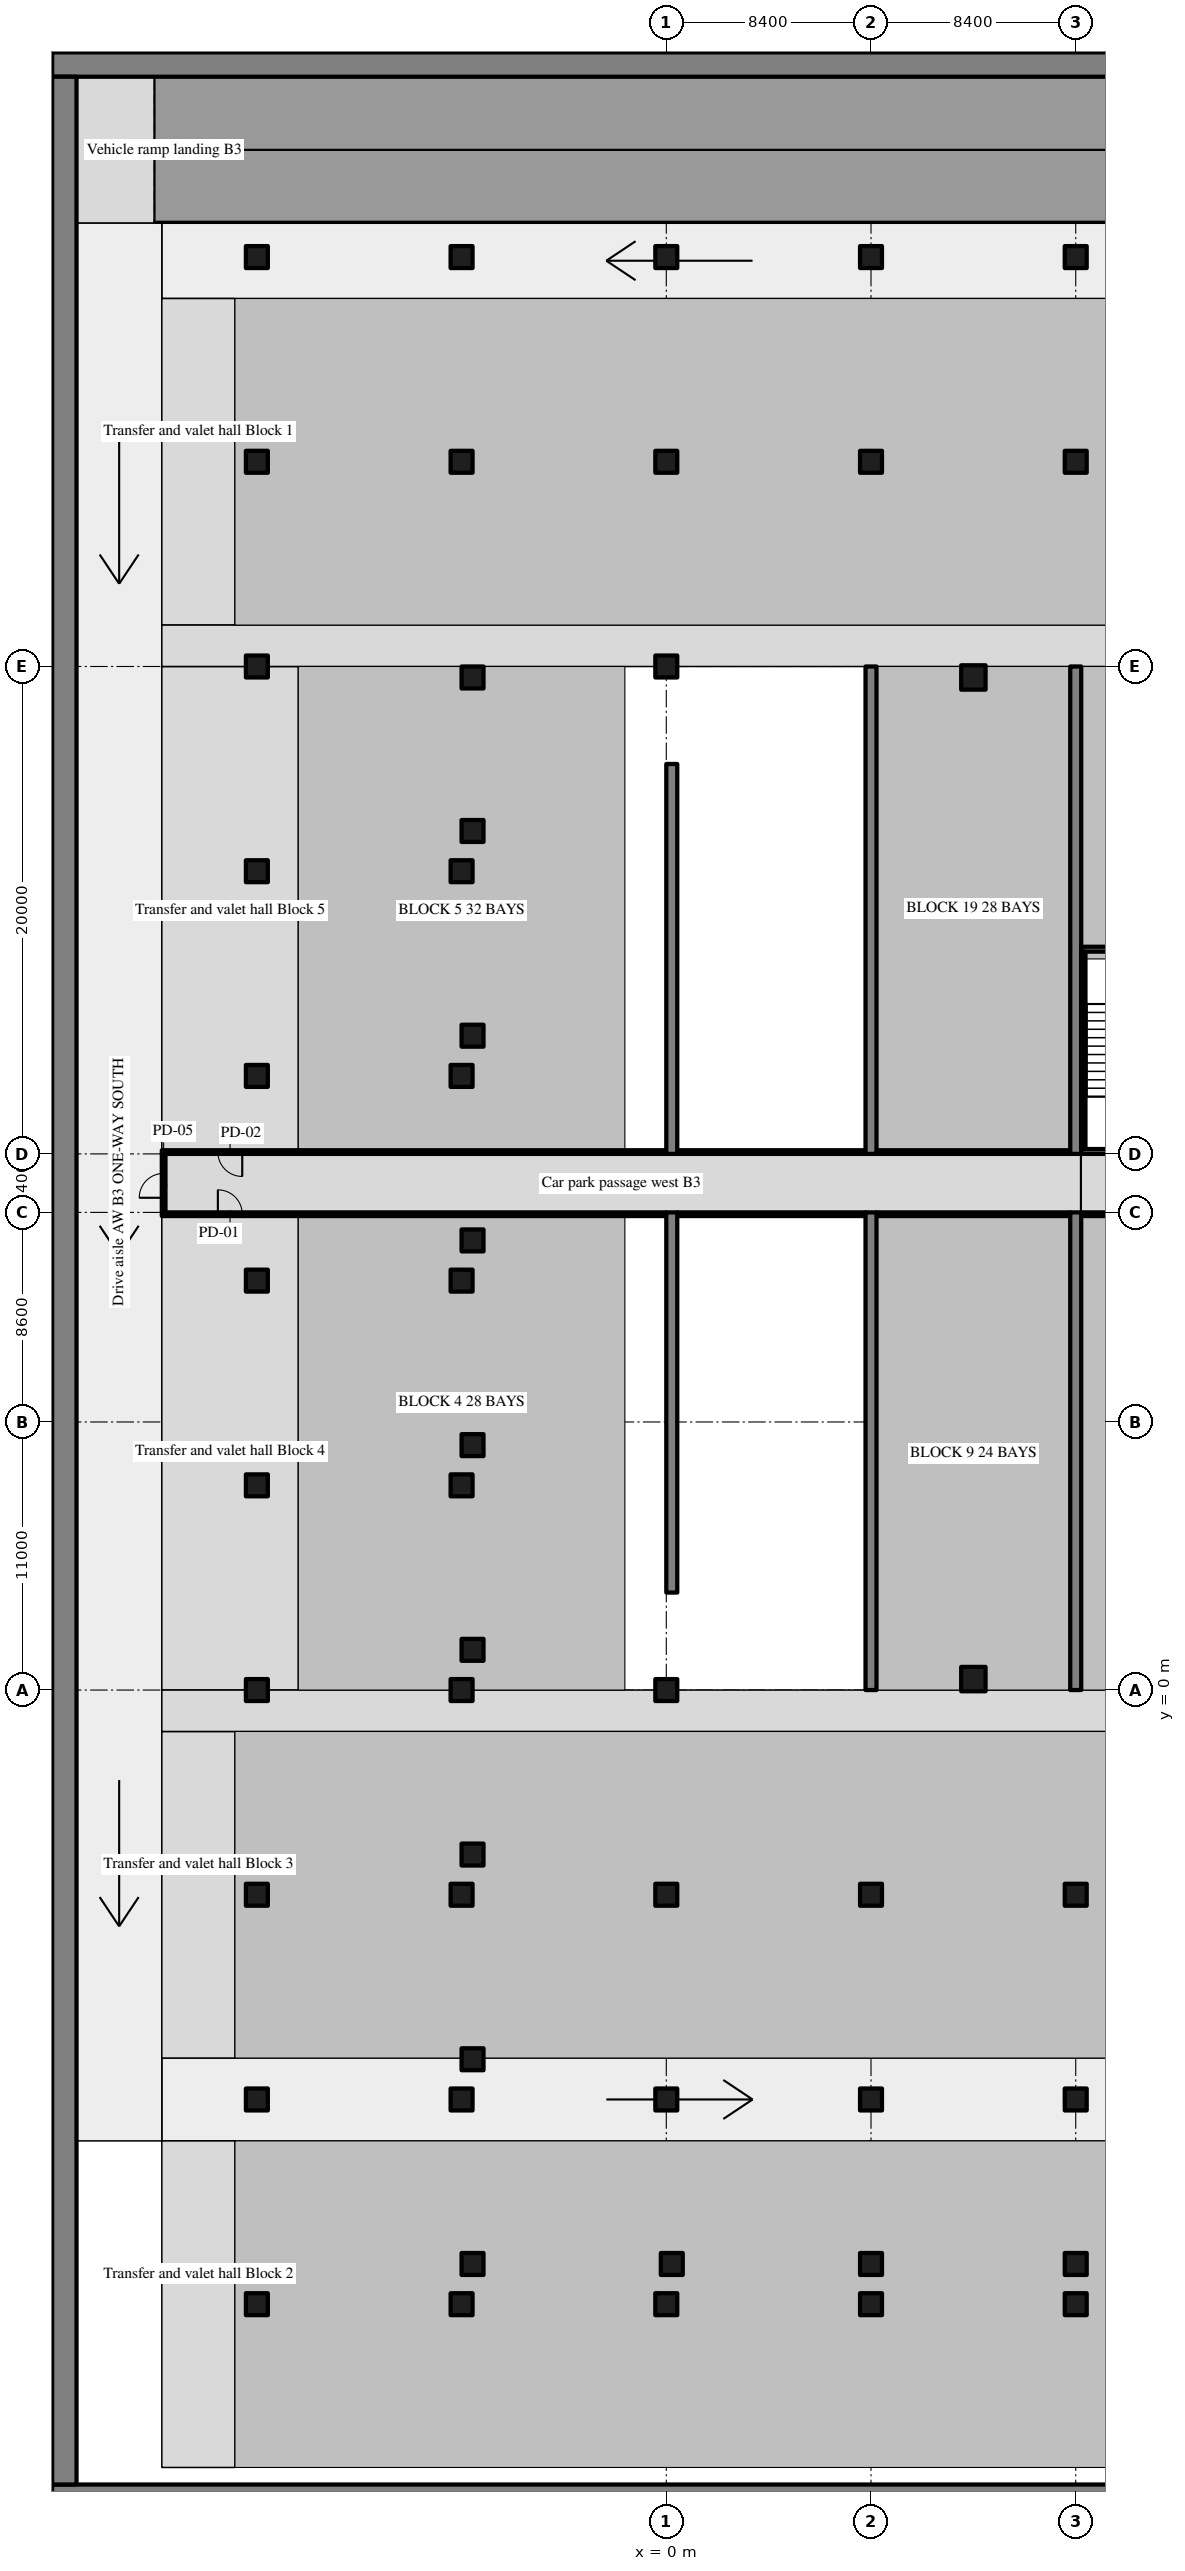
"""IFC4 building model, lengths in metres.
Left out: names, types, materials, properties, quantities, classifications, styles, units other than length and angle.
Written with IfcOpenShell. Run it as: python <this file> out.ifc"""

import sys

from ifc_helpers import new_model, si_unit, direction, frame, frame_2d, origin, origin_2d, place, context, subcontext, project, spatial, rectangle, extrude, source, transform, mapped, element, fill, save


model = new_model("IFC4")
c1 = context("Model", 3, precision=1e-05, world=origin(), true_north=direction((0.0, 1.0)))
c2 = subcontext(c1, "Body", "Model", "MODEL_VIEW")
j1 = project(units=[si_unit("LENGTHUNIT", "METRE"), si_unit("PLANEANGLEUNIT", "RADIAN")], contexts=[c1])
p1 = place(None, origin())
s1 = spatial("IfcSite", under=j1, at=p1, CompositionType="ELEMENT")
p2 = place(p1, origin())
s2 = spatial("IfcBuilding", under=s1, at=p2, CompositionType="ELEMENT")
p3 = place(p2, frame((0.0, 0.0, -13.5)))
s3 = spatial("IfcBuildingStorey", under=s2, at=p3, CompositionType="ELEMENT", Elevation=-13.5)
m1 = source(origin(), c2, "Body", "SweptSolid", [
    extrude(rectangle(XDim=151.2, YDim=1.0, at=frame_2d((75.6, 0.0))), origin(), (0.0, 0.0, 1.0), 4.52),
])
for number, where, z_axis, x_axis in (
    (1, (-25.2, -33.1, -0.3), (0.0, 0.0, 1.0), (1.0, 0.0, 0.0)),
    (2, (-25.2, 66.7, -0.3), (0.0, 0.0, 1.0), (1.0, 0.0, 0.0)),
):
    element("IfcWall", number, at=place(p3, frame(where, z_axis=z_axis, x_axis=x_axis)), inside=s3, PredefinedType="SHEAR", context=c2, shape_type="MappedRepresentation", body=[
        mapped(m1, transform((0.0, 0.0, 0.0), scale=1.0)),
    ])
m2 = source(origin(), c2, "Body", "SweptSolid", [
    extrude(rectangle(XDim=98.8, YDim=1.0, at=frame_2d((49.4, 0.0))), origin(), (0.0, 0.0, 1.0), 4.52),
])
p4 = place(p3, frame((-24.7, -32.6, -0.3), z_axis=(0.0, 0.0, 1.0), x_axis=(0.0, 1.0, 0.0)))
e3 = element("IfcWall", 3, at=p4, inside=s3, PredefinedType="SHEAR", context=c2, shape_type="MappedRepresentation", body=[
    mapped(m2, transform((0.0, 0.0, 0.0), scale=1.0)),
])
m3 = source(origin(), c2, "Body", "SweptSolid", [
    extrude(rectangle(XDim=15.6, YDim=0.45, at=frame_2d((7.8, 0.0))), origin(), (0.0, 0.0, 1.0), 4.52),
])
p5 = place(p3, frame((0.225, 4.0, -0.3), z_axis=(0.0, 0.0, 1.0), x_axis=(0.0, 1.0, 0.0)))
e4 = element("IfcWall", 4, at=p5, inside=s3, PredefinedType="SHEAR", context=c2, shape_type="MappedRepresentation", body=[
    mapped(m3, transform((0.0, 0.0, 0.0), scale=1.0)),
])
m4 = source(origin(), c2, "Body", "SweptSolid", [
    extrude(rectangle(XDim=16.0, YDim=0.45, at=frame_2d((8.0, 0.0))), origin(), (0.0, 0.0, 1.0), 4.52),
])
p6 = place(p3, frame((0.225, 22.0, -0.3), z_axis=(0.0, 0.0, 1.0), x_axis=(0.0, 1.0, 0.0)))
e5 = element("IfcWall", 5, at=p6, inside=s3, PredefinedType="SHEAR", context=c2, shape_type="MappedRepresentation", body=[
    mapped(m4, transform((0.0, 0.0, 0.0), scale=1.0)),
])
m5 = source(origin(), c2, "Body", "SweptSolid", [
    extrude(rectangle(XDim=19.6, YDim=0.45, at=frame_2d((9.8, 0.0))), origin(), (0.0, 0.0, 1.0), 4.52),
])
p7 = place(p3, frame((8.4, 0.0, -0.3), z_axis=(0.0, 0.0, 1.0), x_axis=(0.0, 1.0, 0.0)))
e6 = element("IfcWall", 6, at=p7, inside=s3, PredefinedType="SHEAR", context=c2, shape_type="MappedRepresentation", body=[
    mapped(m5, transform((0.0, 0.0, 0.0), scale=1.0)),
])
m6 = source(origin(), c2, "Body", "SweptSolid", [
    extrude(rectangle(XDim=20.0, YDim=0.45, at=frame_2d((10.0, 0.0))), origin(), (0.0, 0.0, 1.0), 4.52),
])
p8 = place(p3, frame((8.4, 22.0, -0.3), z_axis=(0.0, 0.0, 1.0), x_axis=(0.0, 1.0, 0.0)))
e7 = element("IfcWall", 7, at=p8, inside=s3, PredefinedType="SHEAR", context=c2, shape_type="MappedRepresentation", body=[
    mapped(m6, transform((0.0, 0.0, 0.0), scale=1.0)),
])
p9 = place(p3, frame((16.8, 0.0, -0.3), z_axis=(0.0, 0.0, 1.0), x_axis=(0.0, 1.0, 0.0)))
e8 = element("IfcWall", 8, at=p9, inside=s3, PredefinedType="SHEAR", context=c2, shape_type="MappedRepresentation", body=[
    mapped(m5, transform((0.0, 0.0, 0.0), scale=1.0)),
])
p10 = place(p3, frame((16.8, 22.0, -0.3), z_axis=(0.0, 0.0, 1.0), x_axis=(0.0, 1.0, 0.0)))
e9 = element("IfcWall", 9, at=p10, inside=s3, PredefinedType="SHEAR", context=c2, shape_type="MappedRepresentation", body=[
    mapped(m6, transform((0.0, 0.0, 0.0), scale=1.0)),
])
m7 = source(origin(), c2, "Body", "SweptSolid", [
    extrude(rectangle(XDim=1.0, YDim=1.0, at=origin_2d()), origin(), (0.0, 0.0, 1.0), 4.52),
])
for number, where, z_axis, x_axis in (
    (10, (12.6, 0.45, -0.3), (0.0, 0.0, 1.0), (1.0, 0.0, 0.0)),
    (11, (12.6, 41.55, -0.3), (0.0, 0.0, 1.0), (1.0, 0.0, 0.0)),
):
    element("IfcColumn", number, at=place(p3, frame(where, z_axis=z_axis, x_axis=x_axis)), inside=s3, PredefinedType="COLUMN", context=c2, shape_type="MappedRepresentation", body=[
        mapped(m7, transform((0.0, 0.0, 0.0), scale=1.0)),
    ])
m8 = source(origin(), c2, "Body", "SweptSolid", [
    extrude(rectangle(XDim=0.9, YDim=0.9, at=origin_2d()), origin(), (0.0, 0.0, 1.0), 4.52),
])
for number, where, z_axis, x_axis in (
    (12, (-7.95, -23.55, -0.3), (0.0, 0.0, 1.0), (1.0, 0.0, 0.0)),
    (13, (-7.95, -15.15, -0.3), (0.0, 0.0, 1.0), (1.0, 0.0, 0.0)),
    (14, (-7.95, -6.75, -0.3), (0.0, 0.0, 1.0), (1.0, 0.0, 0.0)),
    (15, (-7.95, 1.65, -0.3), (0.0, 0.0, 1.0), (1.0, 0.0, 0.0)),
    (16, (-7.95, 10.05, -0.3), (0.0, 0.0, 1.0), (1.0, 0.0, 0.0)),
    (17, (-7.95, 18.45, -0.3), (0.0, 0.0, 1.0), (1.0, 0.0, 0.0)),
    (18, (-7.95, 26.85, -0.3), (0.0, 0.0, 1.0), (1.0, 0.0, 0.0)),
    (19, (-7.95, 35.25, -0.3), (0.0, 0.0, 1.0), (1.0, 0.0, 0.0)),
    (20, (-7.95, 41.55, -0.3), (0.0, 0.0, 1.0), (1.0, 0.0, 0.0)),
    (21, (0.225, -23.55, -0.3), (0.0, 0.0, 1.0), (1.0, 0.0, 0.0)),
    (22, (8.4, -23.55, -0.3), (0.0, 0.0, 1.0), (1.0, 0.0, 0.0)),
    (23, (16.8, -23.55, -0.3), (0.0, 0.0, 1.0), (1.0, 0.0, 0.0)),
    (24, (-16.8, -25.2, -0.3), (0.0, 0.0, 1.0), (1.0, 0.0, 0.0)),
    (25, (-16.8, -16.8, -0.3), (0.0, 0.0, 1.0), (1.0, 0.0, 0.0)),
    (26, (-16.8, -8.4, -0.3), (0.0, 0.0, 1.0), (1.0, 0.0, 0.0)),
    (27, (-16.8, 0.0, -0.3), (0.0, 0.0, 1.0), (1.0, 0.0, 0.0)),
    (28, (-16.8, 8.4, -0.3), (0.0, 0.0, 1.0), (1.0, 0.0, 0.0)),
    (29, (-16.8, 16.8, -0.3), (0.0, 0.0, 1.0), (1.0, 0.0, 0.0)),
    (30, (-16.8, 25.2, -0.3), (0.0, 0.0, 1.0), (1.0, 0.0, 0.0)),
    (31, (-16.8, 33.6, -0.3), (0.0, 0.0, 1.0), (1.0, 0.0, 0.0)),
    (32, (-16.8, 42.0, -0.3), (0.0, 0.0, 1.0), (1.0, 0.0, 0.0)),
    (33, (-16.8, 50.4, -0.3), (0.0, 0.0, 1.0), (1.0, 0.0, 0.0)),
    (34, (-16.8, 58.8, -0.3), (0.0, 0.0, 1.0), (1.0, 0.0, 0.0)),
    (35, (-8.4, -25.2, -0.3), (0.0, 0.0, 1.0), (1.0, 0.0, 0.0)),
    (36, (-8.4, -16.8, -0.3), (0.0, 0.0, 1.0), (1.0, 0.0, 0.0)),
    (37, (-8.4, -8.4, -0.3), (0.0, 0.0, 1.0), (1.0, 0.0, 0.0)),
    (38, (-8.4, 0.0, -0.3), (0.0, 0.0, 1.0), (1.0, 0.0, 0.0)),
    (39, (-8.4, 8.4, -0.3), (0.0, 0.0, 1.0), (1.0, 0.0, 0.0)),
    (40, (-8.4, 16.8, -0.3), (0.0, 0.0, 1.0), (1.0, 0.0, 0.0)),
    (41, (-8.4, 25.2, -0.3), (0.0, 0.0, 1.0), (1.0, 0.0, 0.0)),
    (42, (-8.4, 33.6, -0.3), (0.0, 0.0, 1.0), (1.0, 0.0, 0.0)),
    (43, (-8.4, 50.4, -0.3), (0.0, 0.0, 1.0), (1.0, 0.0, 0.0)),
    (44, (-8.4, 58.8, -0.3), (0.0, 0.0, 1.0), (1.0, 0.0, 0.0)),
    (45, (0.0, -25.2, -0.3), (0.0, 0.0, 1.0), (1.0, 0.0, 0.0)),
    (46, (0.0, -16.8, -0.3), (0.0, 0.0, 1.0), (1.0, 0.0, 0.0)),
    (47, (0.0, -8.4, -0.3), (0.0, 0.0, 1.0), (1.0, 0.0, 0.0)),
    (48, (0.0, 0.0, -0.3), (0.0, 0.0, 1.0), (1.0, 0.0, 0.0)),
    (49, (0.0, 42.0, -0.3), (0.0, 0.0, 1.0), (1.0, 0.0, 0.0)),
    (50, (0.0, 50.4, -0.3), (0.0, 0.0, 1.0), (1.0, 0.0, 0.0)),
    (51, (0.0, 58.8, -0.3), (0.0, 0.0, 1.0), (1.0, 0.0, 0.0)),
    (52, (8.4, -25.2, -0.3), (0.0, 0.0, 1.0), (1.0, 0.0, 0.0)),
    (53, (8.4, -16.8, -0.3), (0.0, 0.0, 1.0), (1.0, 0.0, 0.0)),
    (54, (8.4, -8.4, -0.3), (0.0, 0.0, 1.0), (1.0, 0.0, 0.0)),
    (55, (8.4, 50.4, -0.3), (0.0, 0.0, 1.0), (1.0, 0.0, 0.0)),
    (56, (8.4, 58.8, -0.3), (0.0, 0.0, 1.0), (1.0, 0.0, 0.0)),
    (57, (16.8, -25.2, -0.3), (0.0, 0.0, 1.0), (1.0, 0.0, 0.0)),
    (58, (16.8, -16.8, -0.3), (0.0, 0.0, 1.0), (1.0, 0.0, 0.0)),
    (59, (16.8, -8.4, -0.3), (0.0, 0.0, 1.0), (1.0, 0.0, 0.0)),
    (60, (16.8, 50.4, -0.3), (0.0, 0.0, 1.0), (1.0, 0.0, 0.0)),
    (61, (16.8, 58.8, -0.3), (0.0, 0.0, 1.0), (1.0, 0.0, 0.0)),
):
    element("IfcColumn", number, at=place(p3, frame(where, z_axis=z_axis, x_axis=x_axis)), inside=s3, PredefinedType="COLUMN", context=c2, shape_type="MappedRepresentation", body=[
        mapped(m8, transform((0.0, 0.0, 0.0), scale=1.0)),
    ])
m9 = source(origin(), c2, "Body", "SweptSolid", [
    extrude(rectangle(XDim=8.175, YDim=0.2, at=frame_2d((4.087, 0.0))), origin(), (0.0, 0.0, 1.0), 4.52),
])
p11 = place(p3, frame((17.025, 22.1, -0.3), z_axis=(0.0, 0.0, 1.0), x_axis=(1.0, 0.0, 0.0)))
e62 = element("IfcWall", 62, at=p11, inside=s3, PredefinedType="SOLIDWALL", context=c2, shape_type="MappedRepresentation", body=[
    mapped(m9, transform((0.0, 0.0, 0.0), scale=1.0)),
])
m10 = source(origin(), c2, "Body", "SweptSolid", [
    extrude(rectangle(XDim=1.2, YDim=2.1, at=frame_2d((0.6, 1.05))), frame((0.0, 0.11, 0.0), z_axis=(0.0, -1.0, 0.0), x_axis=(1.0, 0.0, 0.0)), (0.0, 0.0, 1.0), 0.22),
])
p12 = place(p11, frame((5.975, 0.0, 0.0)))
e63 = element("IfcOpeningElement", 63, at=p12, cuts=e62, PredefinedType="OPENING", context=c2, shape_type="MappedRepresentation", body=[
    mapped(m10, transform((0.0, 0.0, 0.0), scale=1.0)),
])
p13 = place(p3, frame((17.025, 30.4, -0.3), z_axis=(0.0, 0.0, 1.0), x_axis=(1.0, 0.0, 0.0)))
e64 = element("IfcWall", 64, at=p13, inside=s3, PredefinedType="SOLIDWALL", context=c2, shape_type="MappedRepresentation", body=[
    mapped(m9, transform((0.0, 0.0, 0.0), scale=1.0)),
])
m11 = source(origin(), c2, "Body", "SweptSolid", [
    extrude(rectangle(XDim=1.0, YDim=2.1, at=frame_2d((0.5, 1.05))), frame((0.0, 0.11, 0.0), z_axis=(0.0, -1.0, 0.0), x_axis=(1.0, 0.0, 0.0)), (0.0, 0.0, 1.0), 0.22),
])
p14 = place(p13, frame((6.075, 0.0, 0.0)))
e65 = element("IfcOpeningElement", 65, at=p14, cuts=e64, PredefinedType="OPENING", context=c2, shape_type="MappedRepresentation", body=[
    mapped(m11, transform((0.0, 0.0, 0.0), scale=1.0)),
])
m12 = source(origin(), c2, "Body", "SweptSolid", [
    extrude(rectangle(XDim=8.1, YDim=0.175, at=frame_2d((4.05, 0.0))), origin(), (0.0, 0.0, 1.0), 4.52),
])
p15 = place(p3, frame((17.112, 22.2, -0.3), z_axis=(0.0, 0.0, 1.0), x_axis=(0.0, 1.0, 0.0)))
e66 = element("IfcWall", 66, at=p15, inside=s3, PredefinedType="SOLIDWALL", context=c2, shape_type="MappedRepresentation", body=[
    mapped(m12, transform((0.0, 0.0, 0.0), scale=1.0)),
])
m13 = source(origin(), c2, "Body", "SweptSolid", [
    extrude(rectangle(XDim=20.7, YDim=0.15, at=frame_2d((10.35, 0.0))), origin(), (0.0, 0.0, 1.0), 4.22),
])
p16 = place(p3, frame((-20.7, 19.525, 0.0), z_axis=(0.0, 0.0, 1.0), x_axis=(1.0, 0.0, 0.0)))
e67 = element("IfcWall", 67, at=p16, inside=s3, PredefinedType="PARTITIONING", context=c2, shape_type="MappedRepresentation", body=[
    mapped(m13, transform((0.0, 0.0, 0.0), scale=1.0)),
])
m14 = source(origin(), c2, "Body", "SweptSolid", [
    extrude(rectangle(XDim=1.0, YDim=2.1, at=frame_2d((0.5, 1.05))), frame((0.0, 0.085, 0.0), z_axis=(0.0, -1.0, 0.0), x_axis=(1.0, 0.0, 0.0)), (0.0, 0.0, 1.0), 0.17),
])
p17 = place(p16, frame((2.3, 0.0, 0.0)))
e68 = element("IfcOpeningElement", 68, at=p17, cuts=e67, PredefinedType="OPENING", context=c2, shape_type="MappedRepresentation", body=[
    mapped(m14, transform((0.0, 0.0, 0.0), scale=1.0)),
])
p18 = place(p3, frame((-20.7, 22.075, 0.0), z_axis=(0.0, 0.0, 1.0), x_axis=(1.0, 0.0, 0.0)))
e69 = element("IfcWall", 69, at=p18, inside=s3, PredefinedType="PARTITIONING", context=c2, shape_type="MappedRepresentation", body=[
    mapped(m13, transform((0.0, 0.0, 0.0), scale=1.0)),
])
p19 = place(p18, frame((2.3, 0.0, 0.0)))
e70 = element("IfcOpeningElement", 70, at=p19, cuts=e69, PredefinedType="OPENING", context=c2, shape_type="MappedRepresentation", body=[
    mapped(m14, transform((0.0, 0.0, 0.0), scale=1.0)),
])
m15 = source(origin(), c2, "Body", "SweptSolid", [
    extrude(rectangle(XDim=7.725, YDim=0.15, at=frame_2d((3.863, 0.0))), origin(), (0.0, 0.0, 1.0), 4.22),
])
for number, where, z_axis, x_axis in (
    (71, (0.45, 19.525, 0.0), (0.0, 0.0, 1.0), (1.0, 0.0, 0.0)),
    (72, (0.45, 22.075, 0.0), (0.0, 0.0, 1.0), (1.0, 0.0, 0.0)),
):
    element("IfcWall", number, at=place(p3, frame(where, z_axis=z_axis, x_axis=x_axis)), inside=s3, PredefinedType="PARTITIONING", context=c2, shape_type="MappedRepresentation", body=[
        mapped(m15, transform((0.0, 0.0, 0.0), scale=1.0)),
    ])
m16 = source(origin(), c2, "Body", "SweptSolid", [
    extrude(rectangle(XDim=7.95, YDim=0.15, at=frame_2d((3.975, 0.0))), origin(), (0.0, 0.0, 1.0), 4.22),
])
for number, where, z_axis, x_axis in (
    (73, (8.625, 19.525, 0.0), (0.0, 0.0, 1.0), (1.0, 0.0, 0.0)),
    (74, (8.625, 22.075, 0.0), (0.0, 0.0, 1.0), (1.0, 0.0, 0.0)),
):
    element("IfcWall", number, at=place(p3, frame(where, z_axis=z_axis, x_axis=x_axis)), inside=s3, PredefinedType="PARTITIONING", context=c2, shape_type="MappedRepresentation", body=[
        mapped(m16, transform((0.0, 0.0, 0.0), scale=1.0)),
    ])
m17 = source(origin(), c2, "Body", "SweptSolid", [
    extrude(rectangle(XDim=7.95, YDim=0.15, at=frame_2d((3.975, 0.0))), origin(), (0.0, 0.0, 1.0), 4.22),
])
p20 = place(p3, frame((17.025, 19.525, 0.0), z_axis=(0.0, 0.0, 1.0), x_axis=(1.0, 0.0, 0.0)))
e75 = element("IfcWall", 75, at=p20, inside=s3, PredefinedType="PARTITIONING", context=c2, shape_type="MappedRepresentation", body=[
    mapped(m17, transform((0.0, 0.0, 0.0), scale=1.0)),
])
m18 = source(origin(), c2, "Body", "SweptSolid", [
    extrude(rectangle(XDim=2.4, YDim=0.15, at=frame_2d((1.2, 0.0))), origin(), (0.0, 0.0, 1.0), 4.22),
])
p21 = place(p3, frame((-20.625, 19.6, 0.0), z_axis=(0.0, 0.0, 1.0), x_axis=(0.0, 1.0, 0.0)))
e76 = element("IfcWall", 76, at=p21, inside=s3, PredefinedType="PARTITIONING", context=c2, shape_type="MappedRepresentation", body=[
    mapped(m18, transform((0.0, 0.0, 0.0), scale=1.0)),
])
p22 = place(p21, frame((0.6, 0.0, 0.0)))
e77 = element("IfcOpeningElement", 77, at=p22, cuts=e76, PredefinedType="OPENING", context=c2, shape_type="MappedRepresentation", body=[
    mapped(m14, transform((0.0, 0.0, 0.0), scale=1.0)),
])
m19 = source(origin(), c2, "Body", "SweptSolid", [
    extrude(rectangle(XDim=1.0, YDim=2.1, at=frame_2d((0.5, 1.05))), frame((0.0, 0.025, 0.0), z_axis=(0.0, -1.0, 0.0), x_axis=(1.0, 0.0, 0.0)), (0.0, 0.0, 1.0), 0.05),
])
p23 = place(p17, origin())
e78 = element("IfcDoor", 78, at=p23, inside=s3, OperationType="SINGLE_SWING_LEFT", PredefinedType="DOOR", context=c2, shape_type="MappedRepresentation", body=[
    mapped(m19, transform((0.0, 0.0, 0.0), scale=1.0)),
])
fill(e68, e78)
p24 = place(p19, origin())
e79 = element("IfcDoor", 79, at=p24, inside=s3, OperationType="SINGLE_SWING_RIGHT", PredefinedType="DOOR", context=c2, shape_type="MappedRepresentation", body=[
    mapped(m19, transform((0.0, 0.0, 0.0), scale=1.0)),
])
fill(e70, e79)
p25 = place(p22, origin())
e80 = element("IfcDoor", 80, at=p25, inside=s3, OperationType="SINGLE_SWING_LEFT", PredefinedType="DOOR", context=c2, shape_type="MappedRepresentation", body=[
    mapped(m19, transform((0.0, 0.0, 0.0), scale=1.0)),
])
fill(e77, e80)
save(model, sys.argv[1])
